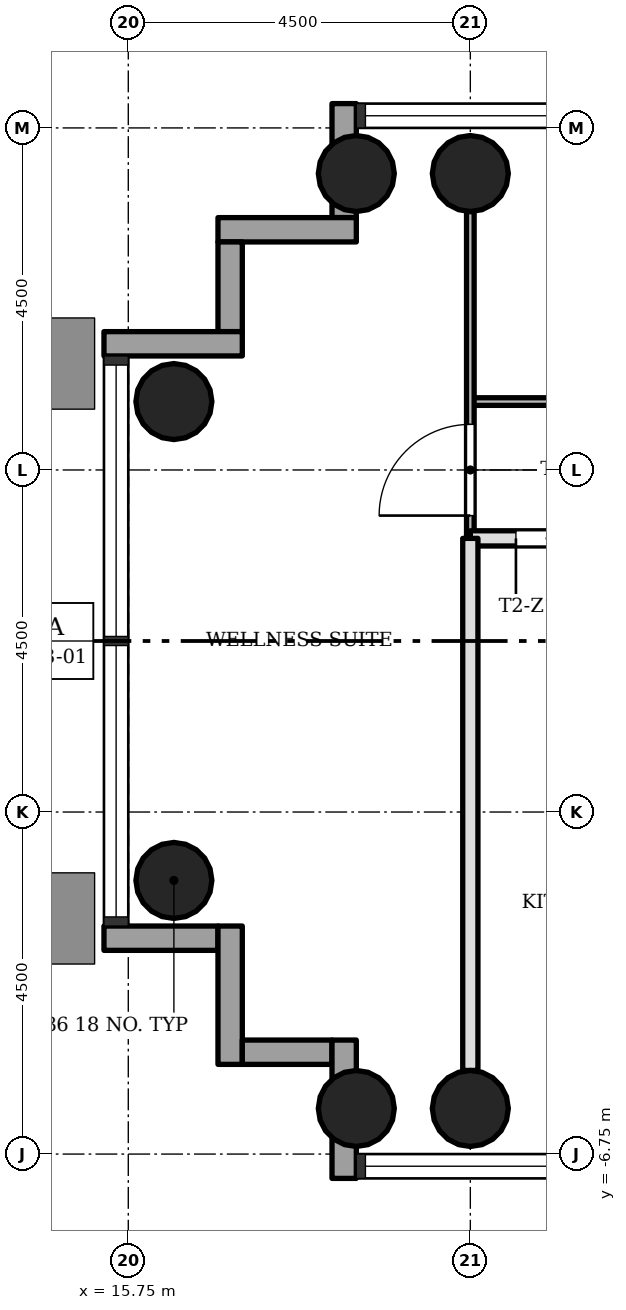
"""IFC4 building model, lengths in metres.
Left out: names, types, materials, properties, quantities, classifications, styles, units other than length and angle.
Written with IfcOpenShell. Run it as: python <this file> out.ifc"""

import sys

from ifc_helpers import new_model, si_unit, direction, frame, frame_2d, origin, origin_2d, place, context, subcontext, project, spatial, rectangle, hollow_circle, extrude, element, fill, save


model = new_model("IFC4")
c1 = context("Model", 3, precision=1e-05, world=origin(), true_north=direction((0.0, 1.0)))
c2 = subcontext(c1, "Body", "Model", "MODEL_VIEW")
j1 = project(units=[si_unit("LENGTHUNIT", "METRE"), si_unit("PLANEANGLEUNIT", "RADIAN")], contexts=[c1])
p1 = place(None, origin())
s1 = spatial("IfcSite", under=j1, at=p1, CompositionType="ELEMENT")
p2 = place(p1, origin())
s2 = spatial("IfcBuilding", under=s1, at=p2, CompositionType="ELEMENT")
p3 = place(p2, frame((0.0, 0.0, 65.3)))
s3 = spatial("IfcBuildingStorey", under=s2, at=p3, CompositionType="ELEMENT", Elevation=65.3)
for number, where, z_axis, x_axis in (
    (1, (20.25, 6.15, 0.0), (0.0, 0.0, 1.0), (1.0, 0.0, 0.0)),
    (2, (20.25, -6.15, 0.0), (0.0, 0.0, 1.0), (1.0, 0.0, 0.0)),
    (3, (18.75, 6.15, 0.0), (0.0, 0.0, 1.0), (1.0, 0.0, 0.0)),
    (4, (18.75, -6.15, 0.0), (0.0, 0.0, 1.0), (1.0, 0.0, 0.0)),
    (5, (16.35, 3.15, 0.0), (0.0, 0.0, 1.0), (1.0, 0.0, 0.0)),
    (6, (16.35, -3.15, 0.0), (0.0, 0.0, 1.0), (1.0, 0.0, 0.0)),
):
    element("IfcColumn", number, at=place(p3, frame(where, z_axis=z_axis, x_axis=x_axis)), inside=s3, PredefinedType="COLUMN", context=c2, shape_type="SweptSolid", body=[
        extrude(hollow_circle(Radius=0.5, WallThickness=0.036, at=origin_2d()), origin(), (0.0, 0.0, 1.0), 3.4),
    ])
p4 = place(p3, frame((18.59, 7.07, -0.3), z_axis=(0.0, 0.0, 1.0), x_axis=(0.0, -1.0, 0.0)))
e7 = element("IfcWall", 7, at=p4, inside=s3, PredefinedType="STANDARD", context=c2, shape_type="SweptSolid", body=[
    extrude(rectangle(XDim=1.5, YDim=0.32, at=frame_2d((0.75, 0.0))), origin(), (0.0, 0.0, 1.0), 3.4),
])
p5 = place(p3, frame((18.75, 5.41, -0.3), z_axis=(0.0, 0.0, 1.0), x_axis=(-1.0, 0.0, 0.0)))
e8 = element("IfcWall", 8, at=p5, inside=s3, PredefinedType="STANDARD", context=c2, shape_type="SweptSolid", body=[
    extrude(rectangle(XDim=1.82, YDim=0.32, at=frame_2d((0.91, 0.0))), origin(), (0.0, 0.0, 1.0), 3.4),
])
p6 = place(p3, frame((17.09, 5.25, -0.3), z_axis=(0.0, 0.0, 1.0), x_axis=(0.0, -1.0, 0.0)))
e9 = element("IfcWall", 9, at=p6, inside=s3, PredefinedType="STANDARD", context=c2, shape_type="SweptSolid", body=[
    extrude(rectangle(XDim=1.18, YDim=0.32, at=frame_2d((0.59, 0.0))), origin(), (0.0, 0.0, 1.0), 3.4),
])
p7 = place(p3, frame((17.25, 3.91, -0.3), z_axis=(0.0, 0.0, 1.0), x_axis=(-1.0, 0.0, 0.0)))
e10 = element("IfcWall", 10, at=p7, inside=s3, PredefinedType="STANDARD", context=c2, shape_type="SweptSolid", body=[
    extrude(rectangle(XDim=1.82, YDim=0.32, at=frame_2d((0.91, 0.0))), origin(), (0.0, 0.0, 1.0), 3.4),
])
p8 = place(p3, frame((15.43, -3.91, -0.3), z_axis=(0.0, 0.0, 1.0), x_axis=(1.0, 0.0, 0.0)))
e11 = element("IfcWall", 11, at=p8, inside=s3, PredefinedType="STANDARD", context=c2, shape_type="SweptSolid", body=[
    extrude(rectangle(XDim=1.5, YDim=0.32, at=frame_2d((0.75, 0.0))), origin(), (0.0, 0.0, 1.0), 3.4),
])
p9 = place(p3, frame((17.09, -3.75, -0.3), z_axis=(0.0, 0.0, 1.0), x_axis=(0.0, -1.0, 0.0)))
e12 = element("IfcWall", 12, at=p9, inside=s3, PredefinedType="STANDARD", context=c2, shape_type="SweptSolid", body=[
    extrude(rectangle(XDim=1.82, YDim=0.32, at=frame_2d((0.91, 0.0))), origin(), (0.0, 0.0, 1.0), 3.4),
])
p10 = place(p3, frame((17.25, -5.41, -0.3), z_axis=(0.0, 0.0, 1.0), x_axis=(1.0, 0.0, 0.0)))
e13 = element("IfcWall", 13, at=p10, inside=s3, PredefinedType="STANDARD", context=c2, shape_type="SweptSolid", body=[
    extrude(rectangle(XDim=1.18, YDim=0.32, at=frame_2d((0.59, 0.0))), origin(), (0.0, 0.0, 1.0), 3.4),
])
p11 = place(p3, frame((18.59, -5.25, -0.3), z_axis=(0.0, 0.0, 1.0), x_axis=(0.0, -1.0, 0.0)))
e14 = element("IfcWall", 14, at=p11, inside=s3, PredefinedType="STANDARD", context=c2, shape_type="SweptSolid", body=[
    extrude(rectangle(XDim=1.82, YDim=0.32, at=frame_2d((0.91, 0.0))), origin(), (0.0, 0.0, 1.0), 3.4),
])
p12 = place(p3, frame((24.75, 1.35, 0.0), z_axis=(0.0, 0.0, 1.0), x_axis=(-1.0, 0.0, 0.0)))
e15 = element("IfcWall", 15, at=p12, inside=s3, PredefinedType="SOLIDWALL", context=c2, shape_type="SweptSolid", body=[
    extrude(rectangle(XDim=4.5, YDim=0.2, at=frame_2d((2.25, 0.0))), origin(), (0.0, 0.0, 1.0), 3.0),
])
p13 = place(p12, frame((3.0, 0.0, 0.0)))
e16 = element("IfcOpeningElement", 16, at=p13, cuts=e15, PredefinedType="OPENING", context=c2, shape_type="SweptSolid", body=[
    extrude(rectangle(XDim=0.9, YDim=2.1, at=frame_2d((0.45, 1.05))), frame((0.0, 0.11, 0.0), z_axis=(0.0, -1.0, 0.0), x_axis=(1.0, 0.0, 0.0)), (0.0, 0.0, 1.0), 0.22),
])
p14 = place(p3, frame((29.25, 3.15, 0.0), z_axis=(0.0, 0.0, 1.0), x_axis=(-1.0, 0.0, 0.0)))
e17 = element("IfcWall", 17, at=p14, inside=s3, PredefinedType="PARTITIONING", context=c2, shape_type="SweptSolid", body=[
    extrude(rectangle(XDim=9.0, YDim=0.1, at=frame_2d((4.5, 0.0))), origin(), (0.0, 0.0, 1.0), 3.0),
])
p15 = place(p14, frame((1.8, 0.0, 0.0)))
e18 = element("IfcOpeningElement", 18, at=p15, cuts=e17, PredefinedType="OPENING", context=c2, shape_type="SweptSolid", body=[
    extrude(rectangle(XDim=0.9, YDim=2.1, at=frame_2d((0.45, 1.05))), frame((0.0, 0.06, 0.0), z_axis=(0.0, -1.0, 0.0), x_axis=(1.0, 0.0, 0.0)), (0.0, 0.0, 1.0), 0.12),
])
p16 = place(p14, frame((6.3, 0.0, 0.0)))
e19 = element("IfcOpeningElement", 19, at=p16, cuts=e17, PredefinedType="OPENING", context=c2, shape_type="SweptSolid", body=[
    extrude(rectangle(XDim=0.9, YDim=2.1, at=frame_2d((0.45, 1.05))), frame((0.0, 0.06, 0.0), z_axis=(0.0, -1.0, 0.0), x_axis=(1.0, 0.0, 0.0)), (0.0, 0.0, 1.0), 0.12),
])
p17 = place(p3, frame((20.25, 1.35, 0.0), z_axis=(0.0, 0.0, 1.0), x_axis=(0.0, 1.0, 0.0)))
e20 = element("IfcWall", 20, at=p17, inside=s3, PredefinedType="PARTITIONING", context=c2, shape_type="SweptSolid", body=[
    extrude(rectangle(XDim=4.3, YDim=0.1, at=frame_2d((2.15, 0.0))), origin(), (0.0, 0.0, 1.0), 3.0),
])
p18 = place(p17, frame((0.3, 0.0, 0.0)))
e21 = element("IfcOpeningElement", 21, at=p18, cuts=e20, PredefinedType="OPENING", context=c2, shape_type="SweptSolid", body=[
    extrude(rectangle(XDim=1.2, YDim=2.1, at=frame_2d((0.6, 1.05))), frame((0.0, 0.06, 0.0), z_axis=(0.0, -1.0, 0.0), x_axis=(1.0, 0.0, 0.0)), (0.0, 0.0, 1.0), 0.12),
])
p19 = place(p3, frame((20.25, -5.65, 0.0), z_axis=(0.0, 0.0, 1.0), x_axis=(0.0, 1.0, 0.0)))
e22 = element("IfcWall", 22, at=p19, inside=s3, PredefinedType="SOLIDWALL", context=c2, shape_type="SweptSolid", body=[
    extrude(rectangle(XDim=7.0, YDim=0.2, at=frame_2d((3.5, 0.0))), origin(), (0.0, 0.0, 1.0), 3.0),
])
p20 = place(p13, origin())
e23 = element("IfcDoor", 23, at=p20, inside=s3, OperationType="SINGLE_SWING_LEFT", PredefinedType="DOOR", context=c2, shape_type="SweptSolid", body=[
    extrude(rectangle(XDim=0.9, YDim=2.1, at=frame_2d((0.45, 1.05))), frame((0.0, 0.025, 0.0), z_axis=(0.0, -1.0, 0.0), x_axis=(1.0, 0.0, 0.0)), (0.0, 0.0, 1.0), 0.05),
])
fill(e16, e23)
p21 = place(p18, origin())
e24 = element("IfcDoor", 24, at=p21, inside=s3, OperationType="SINGLE_SWING_RIGHT", PredefinedType="DOOR", context=c2, shape_type="SweptSolid", body=[
    extrude(rectangle(XDim=1.2, YDim=2.1, at=frame_2d((0.6, 1.05))), frame((0.0, 0.025, 0.0), z_axis=(0.0, -1.0, 0.0), x_axis=(1.0, 0.0, 0.0)), (0.0, 0.0, 1.0), 0.05),
])
fill(e21, e24)
save(model, sys.argv[1])
